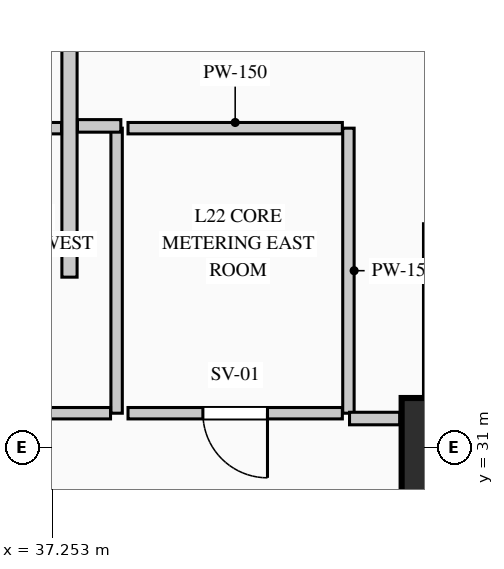
"""IFC4 building model, lengths in metres.
Left out: names, types, materials, properties, quantities, classifications, styles, units other than length and angle.
Written with IfcOpenShell. Run it as: python <this file> out.ifc"""

import sys

from ifc_helpers import new_model, si_unit, direction, frame, frame_2d, origin, origin_2d, place, context, subcontext, project, spatial, rectangle, extrude, element, fill, save


model = new_model("IFC4")
c1 = context("Model", 3, precision=1e-05, world=origin(), true_north=direction((0.0, 1.0)))
c2 = subcontext(c1, "Body", "Model", "MODEL_VIEW")
j1 = project(units=[si_unit("LENGTHUNIT", "METRE"), si_unit("PLANEANGLEUNIT", "RADIAN")], contexts=[c1])
p1 = place(None, origin())
s1 = spatial("IfcSite", under=j1, at=p1, CompositionType="ELEMENT")
p2 = place(p1, origin())
s2 = spatial("IfcBuilding", under=s1, at=p2, CompositionType="ELEMENT")
p3 = place(p2, frame((0.0, 0.0, 97.4)))
s3 = spatial("IfcBuildingStorey", under=s2, at=p3, CompositionType="ELEMENT", Elevation=97.4)
p4 = place(p3, frame((42.5, 31.0, 0.0), z_axis=(0.0, 0.0, 1.0), x_axis=(1.0, 0.0, 0.0)))
e1 = element("IfcColumn", 1, at=p4, inside=s3, PredefinedType="COLUMN", context=c2, shape_type="SweptSolid", body=[
    extrude(rectangle(XDim=1.3, YDim=1.3, at=origin_2d()), origin(), (0.0, 0.0, 1.0), 4.4),
])
p5 = place(p3, frame((37.48, 33.24, 0.0), z_axis=(0.0, 0.0, 1.0), x_axis=(0.0, 1.0, 0.0)))
e2 = element("IfcWall", 2, at=p5, inside=s3, PredefinedType="PARTITIONING", context=c2, shape_type="SweptSolid", body=[
    extrude(rectangle(XDim=7.42, YDim=0.2, at=frame_2d((3.71, 0.0))), origin(), (0.0, 0.0, 1.0), 4.115),
])
p6 = place(p3, frame((38.1, 35.2, 0.0), z_axis=(0.0, 0.0, 1.0), x_axis=(0.0, -1.0, 0.0)))
e3 = element("IfcWall", 3, at=p6, inside=s3, PredefinedType="PARTITIONING", context=c2, shape_type="SweptSolid", body=[
    extrude(rectangle(XDim=3.75, YDim=0.15, at=frame_2d((1.875, 0.0))), origin(), (0.0, 0.0, 1.0), 4.115),
])
p7 = place(p3, frame((38.02, 31.45, 0.0), z_axis=(0.0, 0.0, 1.0), x_axis=(-1.0, 0.0, 0.0)))
e4 = element("IfcWall", 4, at=p7, inside=s3, PredefinedType="PARTITIONING", context=c2, shape_type="SweptSolid", body=[
    extrude(rectangle(XDim=2.77, YDim=0.15, at=frame_2d((1.385, 0.0))), origin(), (0.0, 0.0, 1.0), 4.115),
])
p8 = place(p7, frame((0.96, 0.0, 0.0)))
e5 = element("IfcOpeningElement", 5, at=p8, cuts=e4, PredefinedType="OPENING", context=c2, shape_type="SweptSolid", body=[
    extrude(rectangle(XDim=0.85, YDim=2.1, at=frame_2d((0.425, 1.05))), frame((0.0, 0.085, 0.0), z_axis=(0.0, -1.0, 0.0), x_axis=(1.0, 0.0, 0.0)), (0.0, 0.0, 1.0), 0.17),
])
p9 = place(p3, frame((35.33, 35.2, 0.0), z_axis=(0.0, 0.0, 1.0), x_axis=(1.0, 0.0, 0.0)))
e6 = element("IfcWall", 6, at=p9, inside=s3, PredefinedType="PARTITIONING", context=c2, shape_type="SweptSolid", body=[
    extrude(rectangle(XDim=2.045, YDim=0.15, at=frame_2d((1.022, 0.0))), origin(), (0.0, 0.0, 1.0), 4.115),
])
p10 = place(p3, frame((41.15, 35.2, 0.0), z_axis=(0.0, 0.0, 1.0), x_axis=(0.0, -1.0, 0.0)))
e7 = element("IfcWall", 7, at=p10, inside=s3, PredefinedType="PARTITIONING", context=c2, shape_type="SweptSolid", body=[
    extrude(rectangle(XDim=3.75, YDim=0.15, at=frame_2d((1.875, 0.0))), origin(), (0.0, 0.0, 1.0), 4.115),
])
p11 = place(p3, frame((41.07, 31.45, 0.0), z_axis=(0.0, 0.0, 1.0), x_axis=(-1.0, 0.0, 0.0)))
e8 = element("IfcWall", 8, at=p11, inside=s3, PredefinedType="PARTITIONING", context=c2, shape_type="SweptSolid", body=[
    extrude(rectangle(XDim=2.82, YDim=0.15, at=frame_2d((1.41, 0.0))), origin(), (0.0, 0.0, 1.0), 4.115),
])
p12 = place(p11, frame((0.985, 0.0, 0.0)))
e9 = element("IfcOpeningElement", 9, at=p12, cuts=e8, PredefinedType="OPENING", context=c2, shape_type="SweptSolid", body=[
    extrude(rectangle(XDim=0.85, YDim=2.1, at=frame_2d((0.425, 1.05))), frame((0.0, 0.085, 0.0), z_axis=(0.0, -1.0, 0.0), x_axis=(1.0, 0.0, 0.0)), (0.0, 0.0, 1.0), 0.17),
])
p13 = place(p3, frame((38.25, 35.2, 0.0), z_axis=(0.0, 0.0, 1.0), x_axis=(1.0, 0.0, 0.0)))
e10 = element("IfcWall", 10, at=p13, inside=s3, PredefinedType="PARTITIONING", context=c2, shape_type="SweptSolid", body=[
    extrude(rectangle(XDim=2.82, YDim=0.15, at=frame_2d((1.41, 0.0))), origin(), (0.0, 0.0, 1.0), 4.115),
])
p14 = place(p3, frame((42.22, 33.942, 0.0), z_axis=(0.0, 0.0, 1.0), x_axis=(0.0, -1.0, 0.0)))
e11 = element("IfcWall", 11, at=p14, inside=s3, PredefinedType="PARTITIONING", context=c2, shape_type="SweptSolid", body=[
    extrude(rectangle(XDim=2.267, YDim=0.165, at=frame_2d((1.134, 0.0))), origin(), (0.0, 0.0, 1.0), 4.115),
])
p15 = place(p3, frame((41.825, 31.38, 0.0), z_axis=(0.0, 0.0, 1.0), x_axis=(-1.0, 0.0, 0.0)))
e12 = element("IfcWall", 12, at=p15, inside=s3, PredefinedType="PARTITIONING", context=c2, shape_type="SweptSolid", body=[
    extrude(rectangle(XDim=0.66, YDim=0.165, at=frame_2d((0.33, 0.0))), origin(), (0.0, 0.0, 1.0), 4.115),
])
p16 = place(p3, frame((38.156, 35.23, 0.0), z_axis=(0.0, 0.0, 1.0), x_axis=(-1.0, 0.0, 0.0)))
e13 = element("IfcWall", 13, at=p16, inside=s3, PredefinedType="PARTITIONING", context=c2, shape_type="SweptSolid", body=[
    extrude(rectangle(XDim=0.571, YDim=0.165, at=frame_2d((0.285, 0.0))), origin(), (0.0, 0.0, 1.0), 4.115),
])
p17 = place(p12, origin())
e14 = element("IfcDoor", 14, at=p17, inside=s3, OperationType="SINGLE_SWING_LEFT", PredefinedType="DOOR", context=c2, shape_type="SweptSolid", body=[
    extrude(rectangle(XDim=0.85, YDim=2.1, at=frame_2d((0.425, 1.05))), frame((0.0, 0.025, 0.0), z_axis=(0.0, -1.0, 0.0), x_axis=(1.0, 0.0, 0.0)), (0.0, 0.0, 1.0), 0.05),
])
fill(e9, e14)
save(model, sys.argv[1])
